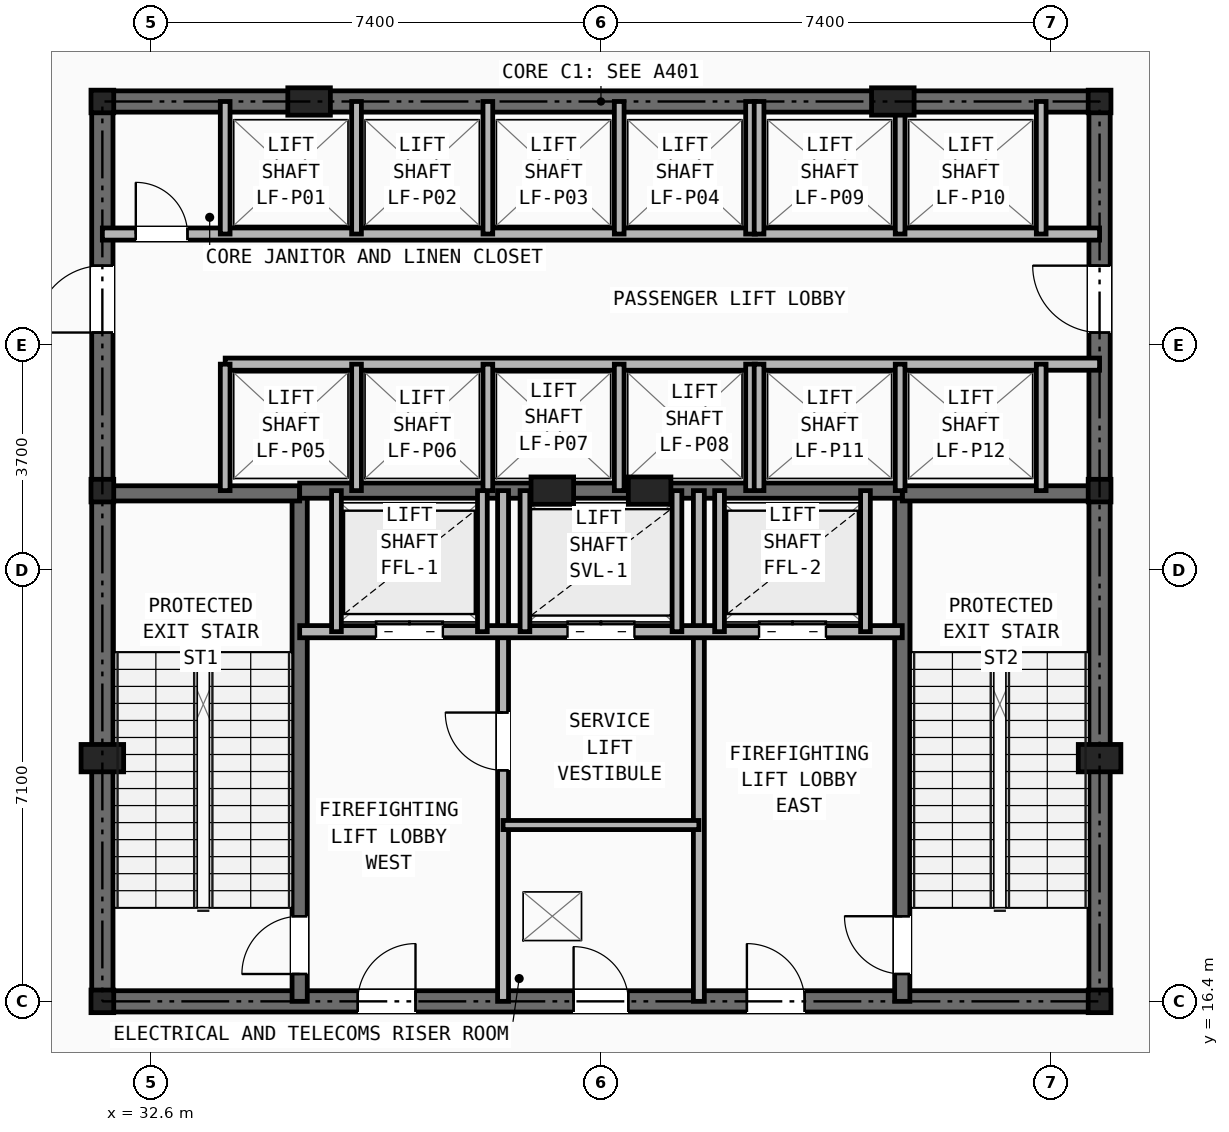
"""IFC4 building model, lengths in metres.
Left out: names, types, materials, properties, quantities, classifications, styles, units other than length and angle.
Written with IfcOpenShell. Run it as: python <this file> out.ifc"""

import sys

from ifc_helpers import new_model, si_unit, direction, frame, frame_2d, origin, origin_2d, place, context, subcontext, project, spatial, rectangle, i_section, extrude, element, fill, save


model = new_model("IFC4")
c1 = context("Model", 3, precision=1e-05, world=origin(), true_north=direction((0.0, 1.0)))
c2 = subcontext(c1, "Body", "Model", "MODEL_VIEW")
j1 = project(units=[si_unit("LENGTHUNIT", "METRE"), si_unit("PLANEANGLEUNIT", "RADIAN")], contexts=[c1])
p1 = place(None, origin())
s1 = spatial("IfcSite", under=j1, at=p1, CompositionType="ELEMENT")
p2 = place(p1, origin())
s2 = spatial("IfcBuilding", under=s1, at=p2, CompositionType="ELEMENT")
p3 = place(p2, frame((0.0, 0.0, 11.0)))
s3 = spatial("IfcBuildingStorey", under=s2, at=p3, CompositionType="ELEMENT", Elevation=11.0)
for number, where, z_axis, x_axis in (
    (1, (31.8, 16.4, 0.0), (0.0, 0.0, 1.0), (1.0, 0.0, 0.0)),
    (2, (48.2, 16.4, 0.0), (0.0, 0.0, 1.0), (1.0, 0.0, 0.0)),
    (3, (31.8, 24.8, 0.0), (0.0, 0.0, 1.0), (1.0, 0.0, 0.0)),
    (4, (48.2, 24.8, 0.0), (0.0, 0.0, 1.0), (1.0, 0.0, 0.0)),
    (5, (31.8, 31.2, 0.0), (0.0, 0.0, 1.0), (1.0, 0.0, 0.0)),
    (6, (48.2, 31.2, 0.0), (0.0, 0.0, 1.0), (1.0, 0.0, 0.0)),
):
    element("IfcColumn", number, at=place(p3, frame(where, z_axis=z_axis, x_axis=x_axis)), inside=s3, PredefinedType="COLUMN", context=c2, shape_type="SweptSolid", body=[
        extrude(i_section(OverallWidth=0.374, OverallDepth=0.372, WebThickness=0.016, FlangeThickness=0.026, at=origin_2d()), origin(), (0.0, 0.0, 1.0), 5.5),
    ])
for number, where, z_axis, x_axis in (
    (7, (31.8, 20.4, 0.0), (0.0, 0.0, 1.0), (1.0, 0.0, 0.0)),
    (8, (48.2, 20.4, 0.0), (0.0, 0.0, 1.0), (1.0, 0.0, 0.0)),
    (9, (35.2, 31.2, 0.0), (0.0, 0.0, 1.0), (1.0, 0.0, 0.0)),
    (10, (44.8, 31.2, 0.0), (0.0, 0.0, 1.0), (1.0, 0.0, 0.0)),
    (11, (39.2, 24.8, 0.0), (0.0, 0.0, 1.0), (1.0, 0.0, 0.0)),
    (12, (40.8, 24.8, 0.0), (0.0, 0.0, 1.0), (1.0, 0.0, 0.0)),
):
    element("IfcColumn", number, at=place(p3, frame(where, z_axis=z_axis, x_axis=x_axis)), inside=s3, PredefinedType="PILASTER", context=c2, shape_type="SweptSolid", body=[
        extrude(rectangle(XDim=0.7, YDim=0.45, at=origin_2d()), origin(), (0.0, 0.0, 1.0), 5.5),
    ])
p4 = place(p3, frame((31.8, 16.4, 0.0), z_axis=(0.0, 0.0, 1.0), x_axis=(1.0, 0.0, 0.0)))
e13 = element("IfcWall", 13, at=p4, inside=s3, PredefinedType="SHEAR", context=c2, shape_type="SweptSolid", body=[
    extrude(rectangle(XDim=16.4, YDim=0.35, at=frame_2d((8.2, 0.0))), origin(), (0.0, 0.0, 1.0), 5.18),
])
p5 = place(p4, frame((7.75, 0.0, 0.0)))
e14 = element("IfcOpeningElement", 14, at=p5, cuts=e13, PredefinedType="OPENING", context=c2, shape_type="SweptSolid", body=[
    extrude(rectangle(XDim=0.9, YDim=2.1, at=frame_2d((0.45, 1.05))), frame((0.0, 0.185, 0.0), z_axis=(0.0, -1.0, 0.0), x_axis=(1.0, 0.0, 0.0)), (0.0, 0.0, 1.0), 0.37),
])
p6 = place(p4, frame((4.2, 0.0, 0.0)))
e15 = element("IfcOpeningElement", 15, at=p6, cuts=e13, PredefinedType="OPENING", context=c2, shape_type="SweptSolid", body=[
    extrude(rectangle(XDim=0.95, YDim=2.1, at=frame_2d((0.475, 1.05))), frame((0.0, 0.185, 0.0), z_axis=(0.0, -1.0, 0.0), x_axis=(1.0, 0.0, 0.0)), (0.0, 0.0, 1.0), 0.37),
])
p7 = place(p4, frame((10.6, 0.0, 0.0)))
e16 = element("IfcOpeningElement", 16, at=p7, cuts=e13, PredefinedType="OPENING", context=c2, shape_type="SweptSolid", body=[
    extrude(rectangle(XDim=0.95, YDim=2.1, at=frame_2d((0.475, 1.05))), frame((0.0, 0.185, 0.0), z_axis=(0.0, -1.0, 0.0), x_axis=(1.0, 0.0, 0.0)), (0.0, 0.0, 1.0), 0.37),
])
p8 = place(p3, frame((31.8, 31.2, 0.0), z_axis=(0.0, 0.0, 1.0), x_axis=(1.0, 0.0, 0.0)))
e17 = element("IfcWall", 17, at=p8, inside=s3, PredefinedType="SHEAR", context=c2, shape_type="SweptSolid", body=[
    extrude(rectangle(XDim=16.4, YDim=0.35, at=frame_2d((8.2, 0.0))), origin(), (0.0, 0.0, 1.0), 5.18),
])
p9 = place(p3, frame((31.8, 16.4, 0.0), z_axis=(0.0, 0.0, 1.0), x_axis=(0.0, 1.0, 0.0)))
e18 = element("IfcWall", 18, at=p9, inside=s3, PredefinedType="SHEAR", context=c2, shape_type="SweptSolid", body=[
    extrude(rectangle(XDim=14.8, YDim=0.35, at=frame_2d((7.4, 0.0))), origin(), (0.0, 0.0, 1.0), 5.18),
])
p10 = place(p9, frame((11.0, 0.0, 0.0)))
e19 = element("IfcOpeningElement", 19, at=p10, cuts=e18, PredefinedType="OPENING", context=c2, shape_type="SweptSolid", body=[
    extrude(rectangle(XDim=1.1, YDim=2.15, at=frame_2d((0.55, 1.075))), frame((0.0, 0.185, 0.0), z_axis=(0.0, -1.0, 0.0), x_axis=(1.0, 0.0, 0.0)), (0.0, 0.0, 1.0), 0.37),
])
p11 = place(p3, frame((48.2, 16.4, 0.0), z_axis=(0.0, 0.0, 1.0), x_axis=(0.0, 1.0, 0.0)))
e20 = element("IfcWall", 20, at=p11, inside=s3, PredefinedType="SHEAR", context=c2, shape_type="SweptSolid", body=[
    extrude(rectangle(XDim=14.8, YDim=0.35, at=frame_2d((7.4, 0.0))), origin(), (0.0, 0.0, 1.0), 5.18),
])
p12 = place(p11, frame((11.0, 0.0, 0.0)))
e21 = element("IfcOpeningElement", 21, at=p12, cuts=e20, PredefinedType="OPENING", context=c2, shape_type="SweptSolid", body=[
    extrude(rectangle(XDim=1.1, YDim=2.15, at=frame_2d((0.55, 1.075))), frame((0.0, 0.185, 0.0), z_axis=(0.0, -1.0, 0.0), x_axis=(1.0, 0.0, 0.0)), (0.0, 0.0, 1.0), 0.37),
])
p13 = place(p3, frame((35.045, 16.4, 0.0), z_axis=(0.0, 0.0, 1.0), x_axis=(0.0, 1.0, 0.0)))
e22 = element("IfcWall", 22, at=p13, inside=s3, PredefinedType="SHEAR", context=c2, shape_type="SweptSolid", body=[
    extrude(rectangle(XDim=8.4, YDim=0.25, at=frame_2d((4.2, 0.0))), origin(), (0.0, 0.0, 1.0), 5.18),
])
p14 = place(p13, frame((0.45, 0.0, 0.0)))
e23 = element("IfcOpeningElement", 23, at=p14, cuts=e22, PredefinedType="OPENING", context=c2, shape_type="SweptSolid", body=[
    extrude(rectangle(XDim=0.95, YDim=2.1, at=frame_2d((0.475, 1.05))), frame((0.0, 0.135, 0.0), z_axis=(0.0, -1.0, 0.0), x_axis=(1.0, 0.0, 0.0)), (0.0, 0.0, 1.0), 0.27),
])
p15 = place(p3, frame((31.8, 24.755, 0.0), z_axis=(0.0, 0.0, 1.0), x_axis=(1.0, 0.0, 0.0)))
e24 = element("IfcWall", 24, at=p15, inside=s3, PredefinedType="SHEAR", context=c2, shape_type="SweptSolid", body=[
    extrude(rectangle(XDim=3.245, YDim=0.25, at=frame_2d((1.623, 0.0))), origin(), (0.0, 0.0, 1.0), 5.18),
])
p16 = place(p3, frame((44.955, 16.4, 0.0), z_axis=(0.0, 0.0, 1.0), x_axis=(0.0, 1.0, 0.0)))
e25 = element("IfcWall", 25, at=p16, inside=s3, PredefinedType="SHEAR", context=c2, shape_type="SweptSolid", body=[
    extrude(rectangle(XDim=8.4, YDim=0.25, at=frame_2d((4.2, 0.0))), origin(), (0.0, 0.0, 1.0), 5.18),
])
p17 = place(p16, frame((0.45, 0.0, 0.0)))
e26 = element("IfcOpeningElement", 26, at=p17, cuts=e25, PredefinedType="OPENING", context=c2, shape_type="SweptSolid", body=[
    extrude(rectangle(XDim=0.95, YDim=2.1, at=frame_2d((0.475, 1.05))), frame((0.0, 0.135, 0.0), z_axis=(0.0, -1.0, 0.0), x_axis=(1.0, 0.0, 0.0)), (0.0, 0.0, 1.0), 0.27),
])
p18 = place(p3, frame((44.955, 24.755, 0.0), z_axis=(0.0, 0.0, 1.0), x_axis=(1.0, 0.0, 0.0)))
e27 = element("IfcWall", 27, at=p18, inside=s3, PredefinedType="SHEAR", context=c2, shape_type="SweptSolid", body=[
    extrude(rectangle(XDim=3.245, YDim=0.25, at=frame_2d((1.623, 0.0))), origin(), (0.0, 0.0, 1.0), 5.18),
])
p19 = place(p3, frame((35.045, 24.8, 0.0), z_axis=(0.0, 0.0, 1.0), x_axis=(1.0, 0.0, 0.0)))
e28 = element("IfcWall", 28, at=p19, inside=s3, PredefinedType="SHEAR", context=c2, shape_type="SweptSolid", body=[
    extrude(rectangle(XDim=9.91, YDim=0.25, at=frame_2d((4.955, 0.0))), origin(), (0.0, 0.0, 1.0), 5.18),
])
p20 = place(p3, frame((38.39, 16.4, 0.0), z_axis=(0.0, 0.0, 1.0), x_axis=(0.0, 1.0, 0.0)))
e29 = element("IfcWall", 29, at=p20, inside=s3, PredefinedType="PARTITIONING", context=c2, shape_type="SweptSolid", body=[
    extrude(rectangle(XDim=8.4, YDim=0.18, at=frame_2d((4.2, 0.0))), origin(), (0.0, 0.0, 1.0), 4.631),
])
p21 = place(p20, frame((3.8, 0.0, 0.0)))
e30 = element("IfcOpeningElement", 30, at=p21, cuts=e29, PredefinedType="OPENING", context=c2, shape_type="SweptSolid", body=[
    extrude(rectangle(XDim=0.95, YDim=2.1, at=frame_2d((0.475, 1.05))), frame((0.0, 0.1, 0.0), z_axis=(0.0, -1.0, 0.0), x_axis=(1.0, 0.0, 0.0)), (0.0, 0.0, 1.0), 0.2),
])
p22 = place(p3, frame((41.61, 16.4, 0.0), z_axis=(0.0, 0.0, 1.0), x_axis=(0.0, 1.0, 0.0)))
e31 = element("IfcWall", 31, at=p22, inside=s3, PredefinedType="PARTITIONING", context=c2, shape_type="SweptSolid", body=[
    extrude(rectangle(XDim=8.4, YDim=0.18, at=frame_2d((4.2, 0.0))), origin(), (0.0, 0.0, 1.0), 4.631),
])
p23 = place(p3, frame((35.045, 22.48, 0.0), z_axis=(0.0, 0.0, 1.0), x_axis=(1.0, 0.0, 0.0)))
e32 = element("IfcWall", 32, at=p23, inside=s3, PredefinedType="SOLIDWALL", context=c2, shape_type="SweptSolid", body=[
    extrude(rectangle(XDim=9.91, YDim=0.2, at=frame_2d((4.955, 0.0))), origin(), (0.0, 0.0, 1.0), 5.18),
])
p24 = place(p23, frame((1.255, 0.0, 0.0)))
e33 = element("IfcOpeningElement", 33, at=p24, cuts=e32, PredefinedType="OPENING", context=c2, shape_type="SweptSolid", body=[
    extrude(rectangle(XDim=1.1, YDim=2.15, at=frame_2d((0.55, 1.075))), frame((0.0, 0.11, 0.0), z_axis=(0.0, -1.0, 0.0), x_axis=(1.0, 0.0, 0.0)), (0.0, 0.0, 1.0), 0.22),
])
p25 = place(p23, frame((7.555, 0.0, 0.0)))
e34 = element("IfcOpeningElement", 34, at=p25, cuts=e32, PredefinedType="OPENING", context=c2, shape_type="SweptSolid", body=[
    extrude(rectangle(XDim=1.1, YDim=2.15, at=frame_2d((0.55, 1.075))), frame((0.0, 0.11, 0.0), z_axis=(0.0, -1.0, 0.0), x_axis=(1.0, 0.0, 0.0)), (0.0, 0.0, 1.0), 0.22),
])
p26 = place(p23, frame((4.405, 0.0, 0.0)))
e35 = element("IfcOpeningElement", 35, at=p26, cuts=e32, PredefinedType="OPENING", context=c2, shape_type="SweptSolid", body=[
    extrude(rectangle(XDim=1.1, YDim=2.15, at=frame_2d((0.55, 1.075))), frame((0.0, 0.11, 0.0), z_axis=(0.0, -1.0, 0.0), x_axis=(1.0, 0.0, 0.0)), (0.0, 0.0, 1.0), 0.22),
])
p27 = place(p3, frame((38.39, 19.3, 0.0), z_axis=(0.0, 0.0, 1.0), x_axis=(1.0, 0.0, 0.0)))
e36 = element("IfcWall", 36, at=p27, inside=s3, PredefinedType="PARTITIONING", context=c2, shape_type="SweptSolid", body=[
    extrude(rectangle(XDim=3.22, YDim=0.15, at=frame_2d((1.61, 0.0))), origin(), (0.0, 0.0, 1.0), 5.18),
])
for number, where, z_axis, x_axis in (
    (37, (35.65, 22.48, 0.0), (0.0, 0.0, 1.0), (0.0, 1.0, 0.0)),
    (38, (38.05, 22.48, 0.0), (0.0, 0.0, 1.0), (0.0, 1.0, 0.0)),
    (39, (41.95, 22.48, 0.0), (0.0, 0.0, 1.0), (0.0, 1.0, 0.0)),
    (40, (44.35, 22.48, 0.0), (0.0, 0.0, 1.0), (0.0, 1.0, 0.0)),
    (41, (38.75, 22.48, 0.0), (0.0, 0.0, 1.0), (0.0, 1.0, 0.0)),
    (42, (41.25, 22.48, 0.0), (0.0, 0.0, 1.0), (0.0, 1.0, 0.0)),
):
    element("IfcWall", number, at=place(p3, frame(where, z_axis=z_axis, x_axis=x_axis)), inside=s3, PredefinedType="SOLIDWALL", context=c2, shape_type="SweptSolid", body=[
        extrude(rectangle(XDim=2.32, YDim=0.16, at=frame_2d((1.16, 0.0))), origin(), (0.0, 0.0, 1.0), 5.18),
    ])
p28 = place(p3, frame((31.8, 29.02, 0.0), z_axis=(0.0, 0.0, 1.0), x_axis=(1.0, 0.0, 0.0)))
e43 = element("IfcWall", 43, at=p28, inside=s3, PredefinedType="SOLIDWALL", context=c2, shape_type="SweptSolid", body=[
    extrude(rectangle(XDim=16.4, YDim=0.2, at=frame_2d((8.2, 0.0))), origin(), (0.0, 0.0, 1.0), 4.631),
])
p29 = place(p28, frame((0.55, 0.0, 0.0)))
e44 = element("IfcOpeningElement", 44, at=p29, cuts=e43, PredefinedType="OPENING", context=c2, shape_type="SweptSolid", body=[
    extrude(rectangle(XDim=0.85, YDim=2.05, at=frame_2d((0.425, 1.025))), frame((0.0, 0.11, 0.0), z_axis=(0.0, -1.0, 0.0), x_axis=(1.0, 0.0, 0.0)), (0.0, 0.0, 1.0), 0.22),
])
p30 = place(p3, frame((33.82, 26.88, 0.0), z_axis=(0.0, 0.0, 1.0), x_axis=(1.0, 0.0, 0.0)))
e45 = element("IfcWall", 45, at=p30, inside=s3, PredefinedType="SOLIDWALL", context=c2, shape_type="SweptSolid", body=[
    extrude(rectangle(XDim=14.38, YDim=0.2, at=frame_2d((7.19, 0.0))), origin(), (0.0, 0.0, 1.0), 4.631),
])
p31 = place(p3, frame((33.82, 29.02, 0.0), z_axis=(0.0, 0.0, 1.0), x_axis=(0.0, 1.0, 0.0)))
e46 = element("IfcWall", 46, at=p31, inside=s3, PredefinedType="SOLIDWALL", context=c2, shape_type="SweptSolid", body=[
    extrude(rectangle(XDim=2.18, YDim=0.16, at=frame_2d((1.09, 0.0))), origin(), (0.0, 0.0, 1.0), 4.631),
])
p32 = place(p3, frame((33.82, 24.8, 0.0), z_axis=(0.0, 0.0, 1.0), x_axis=(0.0, 1.0, 0.0)))
e47 = element("IfcWall", 47, at=p32, inside=s3, PredefinedType="SOLIDWALL", context=c2, shape_type="SweptSolid", body=[
    extrude(rectangle(XDim=2.08, YDim=0.16, at=frame_2d((1.04, 0.0))), origin(), (0.0, 0.0, 1.0), 5.18),
])
for number, where, z_axis, x_axis in (
    (48, (35.98, 29.02, 0.0), (0.0, 0.0, 1.0), (0.0, 1.0, 0.0)),
    (49, (38.14, 29.02, 0.0), (0.0, 0.0, 1.0), (0.0, 1.0, 0.0)),
    (50, (40.3, 29.02, 0.0), (0.0, 0.0, 1.0), (0.0, 1.0, 0.0)),
    (51, (42.46, 29.02, 0.0), (0.0, 0.0, 1.0), (0.0, 1.0, 0.0)),
):
    element("IfcWall", number, at=place(p3, frame(where, z_axis=z_axis, x_axis=x_axis)), inside=s3, PredefinedType="SOLIDWALL", context=c2, shape_type="SweptSolid", body=[
        extrude(rectangle(XDim=2.18, YDim=0.16, at=frame_2d((1.09, 0.0))), origin(), (0.0, 0.0, 1.0), 4.631),
    ])
for number, where, z_axis, x_axis in (
    (52, (35.98, 24.8, 0.0), (0.0, 0.0, 1.0), (0.0, 1.0, 0.0)),
    (53, (38.14, 24.8, 0.0), (0.0, 0.0, 1.0), (0.0, 1.0, 0.0)),
    (54, (40.3, 24.8, 0.0), (0.0, 0.0, 1.0), (0.0, 1.0, 0.0)),
    (55, (42.46, 24.8, 0.0), (0.0, 0.0, 1.0), (0.0, 1.0, 0.0)),
):
    element("IfcWall", number, at=place(p3, frame(where, z_axis=z_axis, x_axis=x_axis)), inside=s3, PredefinedType="SOLIDWALL", context=c2, shape_type="SweptSolid", body=[
        extrude(rectangle(XDim=2.08, YDim=0.16, at=frame_2d((1.04, 0.0))), origin(), (0.0, 0.0, 1.0), 5.18),
    ])
for number, where, z_axis, x_axis in (
    (56, (42.6, 29.02, 0.0), (0.0, 0.0, 1.0), (0.0, 1.0, 0.0)),
    (57, (44.92, 29.02, 0.0), (0.0, 0.0, 1.0), (0.0, 1.0, 0.0)),
    (58, (47.24, 29.02, 0.0), (0.0, 0.0, 1.0), (0.0, 1.0, 0.0)),
):
    element("IfcWall", number, at=place(p3, frame(where, z_axis=z_axis, x_axis=x_axis)), inside=s3, PredefinedType="SOLIDWALL", context=c2, shape_type="SweptSolid", body=[
        extrude(rectangle(XDim=2.18, YDim=0.16, at=frame_2d((1.09, 0.0))), origin(), (0.0, 0.0, 1.0), 4.631),
    ])
for number, where, z_axis, x_axis in (
    (59, (42.6, 24.8, 0.0), (0.0, 0.0, 1.0), (0.0, 1.0, 0.0)),
    (60, (44.92, 24.8, 0.0), (0.0, 0.0, 1.0), (0.0, 1.0, 0.0)),
    (61, (47.24, 24.8, 0.0), (0.0, 0.0, 1.0), (0.0, 1.0, 0.0)),
):
    element("IfcWall", number, at=place(p3, frame(where, z_axis=z_axis, x_axis=x_axis)), inside=s3, PredefinedType="SOLIDWALL", context=c2, shape_type="SweptSolid", body=[
        extrude(rectangle(XDim=2.08, YDim=0.16, at=frame_2d((1.04, 0.0))), origin(), (0.0, 0.0, 1.0), 5.18),
    ])
p33 = place(p5, origin())
e62 = element("IfcDoor", 62, at=p33, inside=s3, OperationType="SINGLE_SWING_LEFT", PredefinedType="DOOR", context=c2, shape_type="SweptSolid", body=[
    extrude(rectangle(XDim=0.9, YDim=2.1, at=frame_2d((0.45, 1.05))), frame((0.0, 0.025, 0.0), z_axis=(0.0, -1.0, 0.0), x_axis=(1.0, 0.0, 0.0)), (0.0, 0.0, 1.0), 0.05),
])
fill(e14, e62)
p34 = place(p21, origin())
e63 = element("IfcDoor", 63, at=p34, inside=s3, OperationType="SINGLE_SWING_RIGHT", PredefinedType="DOOR", context=c2, shape_type="SweptSolid", body=[
    extrude(rectangle(XDim=0.95, YDim=2.1, at=frame_2d((0.475, 1.05))), frame((0.0, 0.025, 0.0), z_axis=(0.0, -1.0, 0.0), x_axis=(1.0, 0.0, 0.0)), (0.0, 0.0, 1.0), 0.05),
])
fill(e30, e63)
p35 = place(p14, origin())
e64 = element("IfcDoor", 64, at=p35, inside=s3, OperationType="SINGLE_SWING_LEFT", PredefinedType="DOOR", context=c2, shape_type="SweptSolid", body=[
    extrude(rectangle(XDim=0.95, YDim=2.1, at=frame_2d((0.475, 1.05))), frame((0.0, 0.025, 0.0), z_axis=(0.0, -1.0, 0.0), x_axis=(1.0, 0.0, 0.0)), (0.0, 0.0, 1.0), 0.05),
])
fill(e23, e64)
p36 = place(p17, origin())
e65 = element("IfcDoor", 65, at=p36, inside=s3, OperationType="SINGLE_SWING_RIGHT", PredefinedType="DOOR", context=c2, shape_type="SweptSolid", body=[
    extrude(rectangle(XDim=0.95, YDim=2.1, at=frame_2d((0.475, 1.05))), frame((0.0, 0.025, 0.0), z_axis=(0.0, -1.0, 0.0), x_axis=(1.0, 0.0, 0.0)), (0.0, 0.0, 1.0), 0.05),
])
fill(e26, e65)
p37 = place(p6, origin())
e66 = element("IfcDoor", 66, at=p37, inside=s3, OperationType="SINGLE_SWING_RIGHT", PredefinedType="DOOR", context=c2, shape_type="SweptSolid", body=[
    extrude(rectangle(XDim=0.95, YDim=2.1, at=frame_2d((0.475, 1.05))), frame((0.0, 0.025, 0.0), z_axis=(0.0, -1.0, 0.0), x_axis=(1.0, 0.0, 0.0)), (0.0, 0.0, 1.0), 0.05),
])
fill(e15, e66)
p38 = place(p7, origin())
e67 = element("IfcDoor", 67, at=p38, inside=s3, OperationType="SINGLE_SWING_LEFT", PredefinedType="DOOR", context=c2, shape_type="SweptSolid", body=[
    extrude(rectangle(XDim=0.95, YDim=2.1, at=frame_2d((0.475, 1.05))), frame((0.0, 0.025, 0.0), z_axis=(0.0, -1.0, 0.0), x_axis=(1.0, 0.0, 0.0)), (0.0, 0.0, 1.0), 0.05),
])
fill(e16, e67)
p39 = place(p24, origin())
e68 = element("IfcDoor", 68, at=p39, inside=s3, OperationType="DOUBLE_DOOR_SLIDING", PredefinedType="DOOR", context=c2, shape_type="SweptSolid", body=[
    extrude(rectangle(XDim=1.1, YDim=2.15, at=frame_2d((0.55, 1.075))), frame((0.0, 0.025, 0.0), z_axis=(0.0, -1.0, 0.0), x_axis=(1.0, 0.0, 0.0)), (0.0, 0.0, 1.0), 0.05),
])
fill(e33, e68)
p40 = place(p25, origin())
e69 = element("IfcDoor", 69, at=p40, inside=s3, OperationType="DOUBLE_DOOR_SLIDING", PredefinedType="DOOR", context=c2, shape_type="SweptSolid", body=[
    extrude(rectangle(XDim=1.1, YDim=2.15, at=frame_2d((0.55, 1.075))), frame((0.0, 0.025, 0.0), z_axis=(0.0, -1.0, 0.0), x_axis=(1.0, 0.0, 0.0)), (0.0, 0.0, 1.0), 0.05),
])
fill(e34, e69)
p41 = place(p26, origin())
e70 = element("IfcDoor", 70, at=p41, inside=s3, OperationType="DOUBLE_DOOR_SLIDING", PredefinedType="DOOR", context=c2, shape_type="SweptSolid", body=[
    extrude(rectangle(XDim=1.1, YDim=2.15, at=frame_2d((0.55, 1.075))), frame((0.0, 0.025, 0.0), z_axis=(0.0, -1.0, 0.0), x_axis=(1.0, 0.0, 0.0)), (0.0, 0.0, 1.0), 0.05),
])
fill(e35, e70)
p42 = place(p29, origin())
e71 = element("IfcDoor", 71, at=p42, inside=s3, OperationType="SINGLE_SWING_LEFT", PredefinedType="DOOR", context=c2, shape_type="SweptSolid", body=[
    extrude(rectangle(XDim=0.85, YDim=2.05, at=frame_2d((0.425, 1.025))), frame((0.0, 0.025, 0.0), z_axis=(0.0, -1.0, 0.0), x_axis=(1.0, 0.0, 0.0)), (0.0, 0.0, 1.0), 0.05),
])
fill(e44, e71)
p43 = place(p10, origin())
e72 = element("IfcDoor", 72, at=p43, inside=s3, OperationType="SINGLE_SWING_LEFT", PredefinedType="DOOR", context=c2, shape_type="SweptSolid", body=[
    extrude(rectangle(XDim=1.1, YDim=2.15, at=frame_2d((0.55, 1.075))), frame((0.0, 0.025, 0.0), z_axis=(0.0, -1.0, 0.0), x_axis=(1.0, 0.0, 0.0)), (0.0, 0.0, 1.0), 0.05),
])
fill(e19, e72)
p44 = place(p12, origin())
e73 = element("IfcDoor", 73, at=p44, inside=s3, OperationType="SINGLE_SWING_RIGHT", PredefinedType="DOOR", context=c2, shape_type="SweptSolid", body=[
    extrude(rectangle(XDim=1.1, YDim=2.15, at=frame_2d((0.55, 1.075))), frame((0.0, 0.025, 0.0), z_axis=(0.0, -1.0, 0.0), x_axis=(1.0, 0.0, 0.0)), (0.0, 0.0, 1.0), 0.05),
])
fill(e21, e73)
save(model, sys.argv[1])
